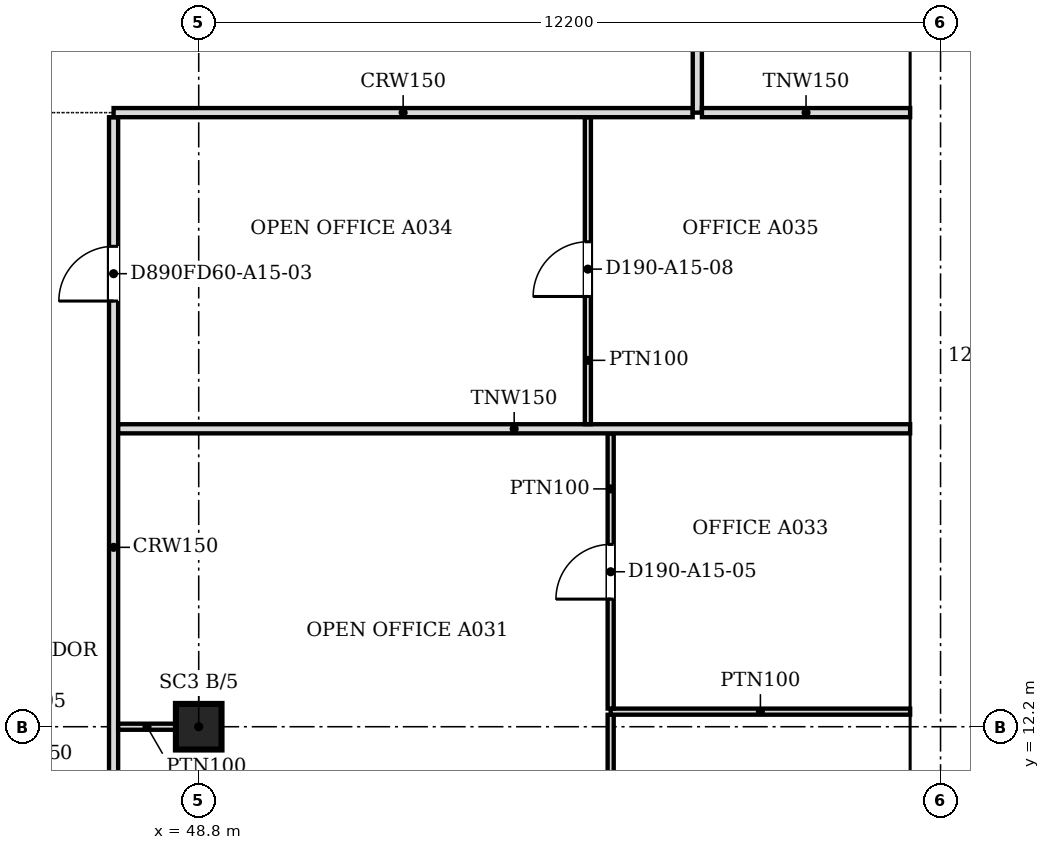
"""IFC4 building model, lengths in metres.
Left out: names, types, materials, properties, quantities, classifications, styles, units other than length and angle.
Written with IfcOpenShell. Run it as: python <this file> out.ifc"""

import sys

from ifc_helpers import new_model, si_unit, direction, frame, frame_2d, origin, origin_2d, place, context, subcontext, project, spatial, polyline, rectangle, outline, extrude, faceted_brep, source, transform, mapped, element, fill, save


model = new_model("IFC4")
c1 = context("Model", 3, precision=1e-05, world=origin(), true_north=direction((0.0, 1.0)))
c2 = subcontext(c1, "Body", "Model", "MODEL_VIEW")
j1 = project(units=[si_unit("LENGTHUNIT", "METRE"), si_unit("PLANEANGLEUNIT", "RADIAN")], contexts=[c1])
p1 = place(None, origin())
s1 = spatial("IfcSite", under=j1, at=p1, CompositionType="ELEMENT")
p2 = place(p1, origin())
s2 = spatial("IfcBuilding", under=s1, at=p2, CompositionType="ELEMENT")
p3 = place(p2, frame((0.0, 0.0, 170.6)))
s3 = spatial("IfcBuildingStorey", under=s2, at=p3, CompositionType="ELEMENT", Elevation=170.6)
p4 = place(p3, frame((48.8, 12.2, 0.0), z_axis=(0.0, 0.0, 1.0), x_axis=(1.0, 0.0, 0.0)))
e1 = element("IfcColumn", 1, at=p4, inside=s3, PredefinedType="COLUMN", context=c2, shape_type="SweptSolid", body=[
    extrude(rectangle(XDim=0.75, YDim=0.75, at=origin_2d()), origin(), (0.0, 0.0, 1.0), 3.6),
])
m1 = source(origin(), c2, "Body", "Brep", [
    faceted_brep([(3.003, -0.25, 0.0), (6.053, -0.25, 3.8), (3.003, -0.25, 7.6), (0.0, -0.25, 3.8), (0.047, 0.25, 3.859), (3.003, 0.25, 7.6), (6.053, 0.25, 3.8), (3.003, 0.25, 0.0), (0.047, 0.25, 3.741), (0.0, 0.0, 3.8)], [[[0, 1, 2, 3]], [[4, 5, 6, 7, 8]], [[7, 6, 1, 0]], [[6, 5, 2, 1]], [[5, 4, 9, 3, 2]], [[8, 7, 0, 3, 9]], [[8, 9, 4]]]),
])
p5 = place(p3, frame((60.75, 6.146, -3.8), z_axis=(0.0, 0.0, 1.0), x_axis=(0.0, 1.0, 0.0)))
e2 = element("IfcWall", 2, at=p5, inside=s3, PredefinedType="SOLIDWALL", context=c2, shape_type="MappedRepresentation", body=[
    mapped(m1, transform((0.0, 0.0, 0.0), scale=1.0)),
])
m2 = source(origin(), c2, "Body", "SweptSolid", [
    extrude(outline(polyline([(3.005, 0.401), (5.733, 3.8), (3.005, 7.199), (0.319, 3.8), (3.005, 0.401)])), frame((0.0, 0.26, 0.0), z_axis=(0.0, -1.0, 0.0), x_axis=(1.0, 0.0, 0.0)), (0.0, 0.0, 1.0), 0.52),
])
p6 = place(p5, origin())
e3 = element("IfcOpeningElement", 3, at=p6, cuts=e2, PredefinedType="OPENING", context=c2, shape_type="MappedRepresentation", body=[
    mapped(m2, transform((0.0, 0.0, 0.0), scale=1.0)),
])
m3 = source(origin(), c2, "Body", "SweptSolid", [
    extrude(outline(polyline([(3.05, 0.0), (6.1, 3.8), (3.05, 7.6), (0.0, 3.8), (3.05, 0.0)])), frame((0.0, 0.25, 0.0), z_axis=(0.0, -1.0, 0.0), x_axis=(1.0, 0.0, 0.0)), (0.0, 0.0, 1.0), 0.5),
])
p7 = place(p3, frame((60.75, 12.2, -3.8), z_axis=(0.0, 0.0, 1.0), x_axis=(0.0, 1.0, 0.0)))
e4 = element("IfcWall", 4, at=p7, inside=s3, PredefinedType="SOLIDWALL", context=c2, shape_type="MappedRepresentation", body=[
    mapped(m3, transform((0.0, 0.0, 0.0), scale=1.0)),
])
m4 = source(origin(), c2, "Body", "SweptSolid", [
    extrude(outline(polyline([(3.05, 0.399), (5.78, 3.8), (3.05, 7.2), (0.321, 3.8), (3.05, 0.399)])), frame((0.0, 0.26, 0.0), z_axis=(0.0, -1.0, 0.0), x_axis=(1.0, 0.0, 0.0)), (0.0, 0.0, 1.0), 0.52),
])
p8 = place(p7, origin())
e5 = element("IfcOpeningElement", 5, at=p8, cuts=e4, PredefinedType="OPENING", context=c2, shape_type="MappedRepresentation", body=[
    mapped(m4, transform((0.0, 0.0, 0.0), scale=1.0)),
])
m5 = source(origin(), c2, "Body", "Brep", [
    faceted_brep([(3.05, -0.25, 0.0), (6.1, -0.25, 3.8), (6.1, -0.25, 3.8), (3.05, -0.25, 7.6), (0.0, -0.25, 3.8), (0.0, 0.25, 3.8), (3.05, 0.25, 7.6), (6.1, 0.25, 3.8), (6.1, 0.25, 3.8), (3.05, 0.25, 0.0)], [[[0, 1, 2, 3, 4]], [[5, 6, 7, 8, 9]], [[9, 8, 1, 0]], [[7, 6, 3, 2]], [[6, 5, 4, 3]], [[5, 9, 0, 4]], [[1, 8, 7, 2]]]),
])
p9 = place(p3, frame((60.75, 18.3, -3.8), z_axis=(0.0, 0.0, 1.0), x_axis=(0.0, 1.0, 0.0)))
e6 = element("IfcWall", 6, at=p9, inside=s3, PredefinedType="SOLIDWALL", context=c2, shape_type="MappedRepresentation", body=[
    mapped(m5, transform((0.0, 0.0, 0.0), scale=1.0)),
])
p10 = place(p9, origin())
e7 = element("IfcOpeningElement", 7, at=p10, cuts=e6, PredefinedType="OPENING", context=c2, shape_type="MappedRepresentation", body=[
    mapped(m4, transform((0.0, 0.0, 0.0), scale=1.0)),
])
p11 = place(p2, frame((0.0, 0.0, 174.4)))
s4 = spatial("IfcBuildingStorey", under=s2, at=p11, CompositionType="ELEMENT", Elevation=174.4)
m6 = source(origin(), c2, "Body", "SweptSolid", [
    extrude(outline(polyline([(3.05, 0.0), (6.1, 3.8), (3.05, 7.6), (0.0, 3.8), (3.05, 0.0)])), frame((0.0, 0.25, 0.0), z_axis=(0.0, -1.0, 0.0), x_axis=(1.0, 0.0, 0.0)), (0.0, 0.0, 1.0), 0.5),
])
p12 = place(p11, frame((60.75, 9.15, -3.8), z_axis=(0.0, 0.0, 1.0), x_axis=(0.0, 1.0, 0.0)))
e8 = element("IfcWall", 8, at=p12, inside=s4, PredefinedType="SOLIDWALL", context=c2, shape_type="MappedRepresentation", body=[
    mapped(m6, transform((0.0, 0.0, 0.0), scale=1.0)),
])
m7 = source(origin(), c2, "Body", "SweptSolid", [
    extrude(outline(polyline([(3.05, 0.399), (5.78, 3.8), (3.05, 7.2), (0.321, 3.8), (3.05, 0.399)])), frame((0.0, 0.26, 0.0), z_axis=(0.0, -1.0, 0.0), x_axis=(1.0, 0.0, 0.0)), (0.0, 0.0, 1.0), 0.52),
])
p13 = place(p12, origin())
e9 = element("IfcOpeningElement", 9, at=p13, cuts=e8, PredefinedType="OPENING", context=c2, shape_type="MappedRepresentation", body=[
    mapped(m7, transform((0.0, 0.0, 0.0), scale=1.0)),
])
p14 = place(p11, frame((60.75, 15.25, -3.8), z_axis=(0.0, 0.0, 1.0), x_axis=(0.0, 1.0, 0.0)))
e10 = element("IfcWall", 10, at=p14, inside=s4, PredefinedType="SOLIDWALL", context=c2, shape_type="MappedRepresentation", body=[
    mapped(m6, transform((0.0, 0.0, 0.0), scale=1.0)),
])
p15 = place(p14, origin())
e11 = element("IfcOpeningElement", 11, at=p15, cuts=e10, PredefinedType="OPENING", context=c2, shape_type="MappedRepresentation", body=[
    mapped(m7, transform((0.0, 0.0, 0.0), scale=1.0)),
])
m8 = source(origin(), c2, "Body", "Brep", [
    faceted_brep([(3.05, -0.25, 0.0), (6.1, -0.25, 3.8), (6.1, -0.25, 3.8), (3.05, -0.25, 7.6), (0.0, -0.25, 3.8), (0.0, 0.25, 3.8), (3.05, 0.25, 7.6), (6.1, 0.25, 3.8), (6.1, 0.25, 3.8), (3.05, 0.25, 0.0)], [[[0, 1, 2, 3, 4]], [[5, 6, 7, 8, 9]], [[9, 8, 1, 0]], [[7, 6, 3, 2]], [[6, 5, 4, 3]], [[5, 9, 0, 4]], [[1, 8, 7, 2]]]),
])
p16 = place(p11, frame((60.75, 21.35, -3.8), z_axis=(0.0, 0.0, 1.0), x_axis=(0.0, 1.0, 0.0)))
e12 = element("IfcWall", 12, at=p16, inside=s4, PredefinedType="SOLIDWALL", context=c2, shape_type="MappedRepresentation", body=[
    mapped(m8, transform((0.0, 0.0, 0.0), scale=1.0)),
])
p17 = place(p16, origin())
e13 = element("IfcOpeningElement", 13, at=p17, cuts=e12, PredefinedType="OPENING", context=c2, shape_type="MappedRepresentation", body=[
    mapped(m7, transform((0.0, 0.0, 0.0), scale=1.0)),
])
p18 = place(p3, frame((47.4, 22.224, 0.0), z_axis=(0.0, 0.0, 1.0), x_axis=(0.0, -1.0, 0.0)))
e14 = element("IfcWall", 14, at=p18, inside=s3, PredefinedType="PARTITIONING", context=c2, shape_type="SweptSolid", body=[
    extrude(rectangle(XDim=18.024, YDim=0.15, at=frame_2d((9.012, 0.0))), origin(), (0.0, 0.0, 1.0), 3.067),
])
m9 = source(origin(), c2, "Body", "SweptSolid", [
    extrude(rectangle(XDim=0.9, YDim=2.1, at=frame_2d((0.45, 1.05))), frame((0.0, 0.085, 0.0), z_axis=(0.0, -1.0, 0.0), x_axis=(1.0, 0.0, 0.0)), (0.0, 0.0, 1.0), 0.17),
])
p19 = place(p18, frame((2.123, 0.0, 0.0)))
e15 = element("IfcOpeningElement", 15, at=p19, cuts=e14, PredefinedType="OPENING", context=c2, shape_type="MappedRepresentation", body=[
    mapped(m9, transform((0.0, 0.0, 0.0), scale=1.0)),
])
p20 = place(p18, frame((11.124, 0.0, 0.0)))
e16 = element("IfcOpeningElement", 16, at=p20, cuts=e14, PredefinedType="OPENING", context=c2, shape_type="MappedRepresentation", body=[
    mapped(m9, transform((0.0, 0.0, 0.0), scale=1.0)),
])
p21 = place(p3, frame((55.575, 12.397, 0.0), z_axis=(0.0, 0.0, 1.0), x_axis=(0.0, -1.0, 0.0)))
e17 = element("IfcWall", 17, at=p21, inside=s3, PredefinedType="PARTITIONING", context=c2, shape_type="SweptSolid", body=[
    extrude(rectangle(XDim=4.297, YDim=0.1, at=frame_2d((2.148, 0.0))), origin(), (0.0, 0.0, 1.0), 3.067),
])
m10 = source(origin(), c2, "Body", "SweptSolid", [
    extrude(rectangle(XDim=0.9, YDim=2.1, at=frame_2d((0.45, 1.05))), frame((0.0, 0.06, 0.0), z_axis=(0.0, -1.0, 0.0), x_axis=(1.0, 0.0, 0.0)), (0.0, 0.0, 1.0), 0.12),
])
p22 = place(p21, frame((1.697, 0.0, 0.0)))
e18 = element("IfcOpeningElement", 18, at=p22, cuts=e17, PredefinedType="OPENING", context=c2, shape_type="MappedRepresentation", body=[
    mapped(m10, transform((0.0, 0.0, 0.0), scale=1.0)),
])
p23 = place(p3, frame((48.425, 12.2, 0.0), z_axis=(0.0, 0.0, 1.0), x_axis=(-1.0, 0.0, 0.0)))
e19 = element("IfcWall", 19, at=p23, inside=s3, PredefinedType="PARTITIONING", context=c2, shape_type="SweptSolid", body=[
    extrude(rectangle(XDim=0.95, YDim=0.1, at=frame_2d((0.475, 0.0))), origin(), (0.0, 0.0, 1.0), 3.067),
])
p24 = place(p3, frame((55.575, 12.448, 0.0), z_axis=(0.0, 0.0, 1.0), x_axis=(1.0, 0.0, 0.0)))
e20 = element("IfcWall", 20, at=p24, inside=s3, PredefinedType="PARTITIONING", context=c2, shape_type="SweptSolid", body=[
    extrude(rectangle(XDim=4.925, YDim=0.1, at=frame_2d((2.462, 0.0))), origin(), (0.0, 0.0, 1.0), 3.067),
])
p25 = place(p3, frame((55.575, 17.024, 0.0), z_axis=(0.0, 0.0, 1.0), x_axis=(0.0, -1.0, 0.0)))
e21 = element("IfcWall", 21, at=p25, inside=s3, PredefinedType="PARTITIONING", context=c2, shape_type="SweptSolid", body=[
    extrude(rectangle(XDim=4.525, YDim=0.1, at=frame_2d((2.263, 0.0))), origin(), (0.0, 0.0, 1.0), 3.067),
])
p26 = place(p25, frame((1.825, 0.0, 0.0)))
e22 = element("IfcOpeningElement", 22, at=p26, cuts=e21, PredefinedType="OPENING", context=c2, shape_type="MappedRepresentation", body=[
    mapped(m10, transform((0.0, 0.0, 0.0), scale=1.0)),
])
p27 = place(p3, frame((47.476, 17.1, 0.0), z_axis=(0.0, 0.0, 1.0), x_axis=(1.0, 0.0, 0.0)))
e23 = element("IfcWall", 23, at=p27, inside=s3, PredefinedType="PARTITIONING", context=c2, shape_type="SweptSolid", body=[
    extrude(rectangle(XDim=13.024, YDim=0.15, at=frame_2d((6.512, 0.0))), origin(), (0.0, 0.0, 1.0), 3.067),
])
p28 = place(p3, frame((55.2, 22.224, 0.0), z_axis=(0.0, 0.0, 1.0), x_axis=(0.0, -1.0, 0.0)))
e24 = element("IfcWall", 24, at=p28, inside=s3, PredefinedType="PARTITIONING", context=c2, shape_type="SweptSolid", body=[
    extrude(rectangle(XDim=5.048, YDim=0.1, at=frame_2d((2.524, 0.0))), origin(), (0.0, 0.0, 1.0), 3.067),
])
p29 = place(p28, frame((2.048, 0.0, 0.0)))
e25 = element("IfcOpeningElement", 25, at=p29, cuts=e24, PredefinedType="OPENING", context=c2, shape_type="MappedRepresentation", body=[
    mapped(m10, transform((0.0, 0.0, 0.0), scale=1.0)),
])
p30 = place(p3, frame((47.4, 22.3, 0.0), z_axis=(0.0, 0.0, 1.0), x_axis=(1.0, 0.0, 0.0)))
e26 = element("IfcWall", 26, at=p30, inside=s3, PredefinedType="PARTITIONING", context=c2, shape_type="SweptSolid", body=[
    extrude(rectangle(XDim=9.524, YDim=0.15, at=frame_2d((4.762, 0.0))), origin(), (0.0, 0.0, 1.0), 3.067),
])
p31 = place(p3, frame((57.0, 30.6, 0.0), z_axis=(0.0, 0.0, 1.0), x_axis=(0.0, -1.0, 0.0)))
e27 = element("IfcWall", 27, at=p31, inside=s3, PredefinedType="PARTITIONING", context=c2, shape_type="SweptSolid", body=[
    extrude(rectangle(XDim=8.3, YDim=0.15, at=frame_2d((4.15, 0.0))), origin(), (0.0, 0.0, 1.0), 3.067),
])
p32 = place(p31, frame((3.7, 0.0, 0.0)))
e28 = element("IfcOpeningElement", 28, at=p32, cuts=e27, PredefinedType="OPENING", context=c2, shape_type="MappedRepresentation", body=[
    mapped(m9, transform((0.0, 0.0, 0.0), scale=1.0)),
])
p33 = place(p3, frame((57.076, 22.3, 0.0), z_axis=(0.0, 0.0, 1.0), x_axis=(1.0, 0.0, 0.0)))
e29 = element("IfcWall", 29, at=p33, inside=s3, PredefinedType="PARTITIONING", context=c2, shape_type="SweptSolid", body=[
    extrude(rectangle(XDim=3.424, YDim=0.15, at=frame_2d((1.712, 0.0))), origin(), (0.0, 0.0, 1.0), 3.067),
])
m11 = source(origin(), c2, "Body", "SweptSolid", [
    extrude(rectangle(XDim=0.9, YDim=2.1, at=frame_2d((0.45, 1.05))), frame((0.0, 0.025, 0.0), z_axis=(0.0, -1.0, 0.0), x_axis=(1.0, 0.0, 0.0)), (0.0, 0.0, 1.0), 0.05),
])
p34 = place(p26, origin())
e30 = element("IfcDoor", 30, at=p34, inside=s3, OperationType="SINGLE_SWING_RIGHT", PredefinedType="DOOR", context=c2, shape_type="MappedRepresentation", body=[
    mapped(m11, transform((0.0, 0.0, 0.0), scale=1.0)),
])
fill(e22, e30)
p35 = place(p29, origin())
e31 = element("IfcDoor", 31, at=p35, inside=s3, OperationType="SINGLE_SWING_RIGHT", PredefinedType="DOOR", context=c2, shape_type="MappedRepresentation", body=[
    mapped(m11, transform((0.0, 0.0, 0.0), scale=1.0)),
])
fill(e25, e31)
p36 = place(p19, origin())
e32 = element("IfcDoor", 32, at=p36, inside=s3, OperationType="SINGLE_SWING_RIGHT", PredefinedType="DOOR", context=c2, shape_type="MappedRepresentation", body=[
    mapped(m11, transform((0.0, 0.0, 0.0), scale=1.0)),
])
fill(e15, e32)
save(model, sys.argv[1])
